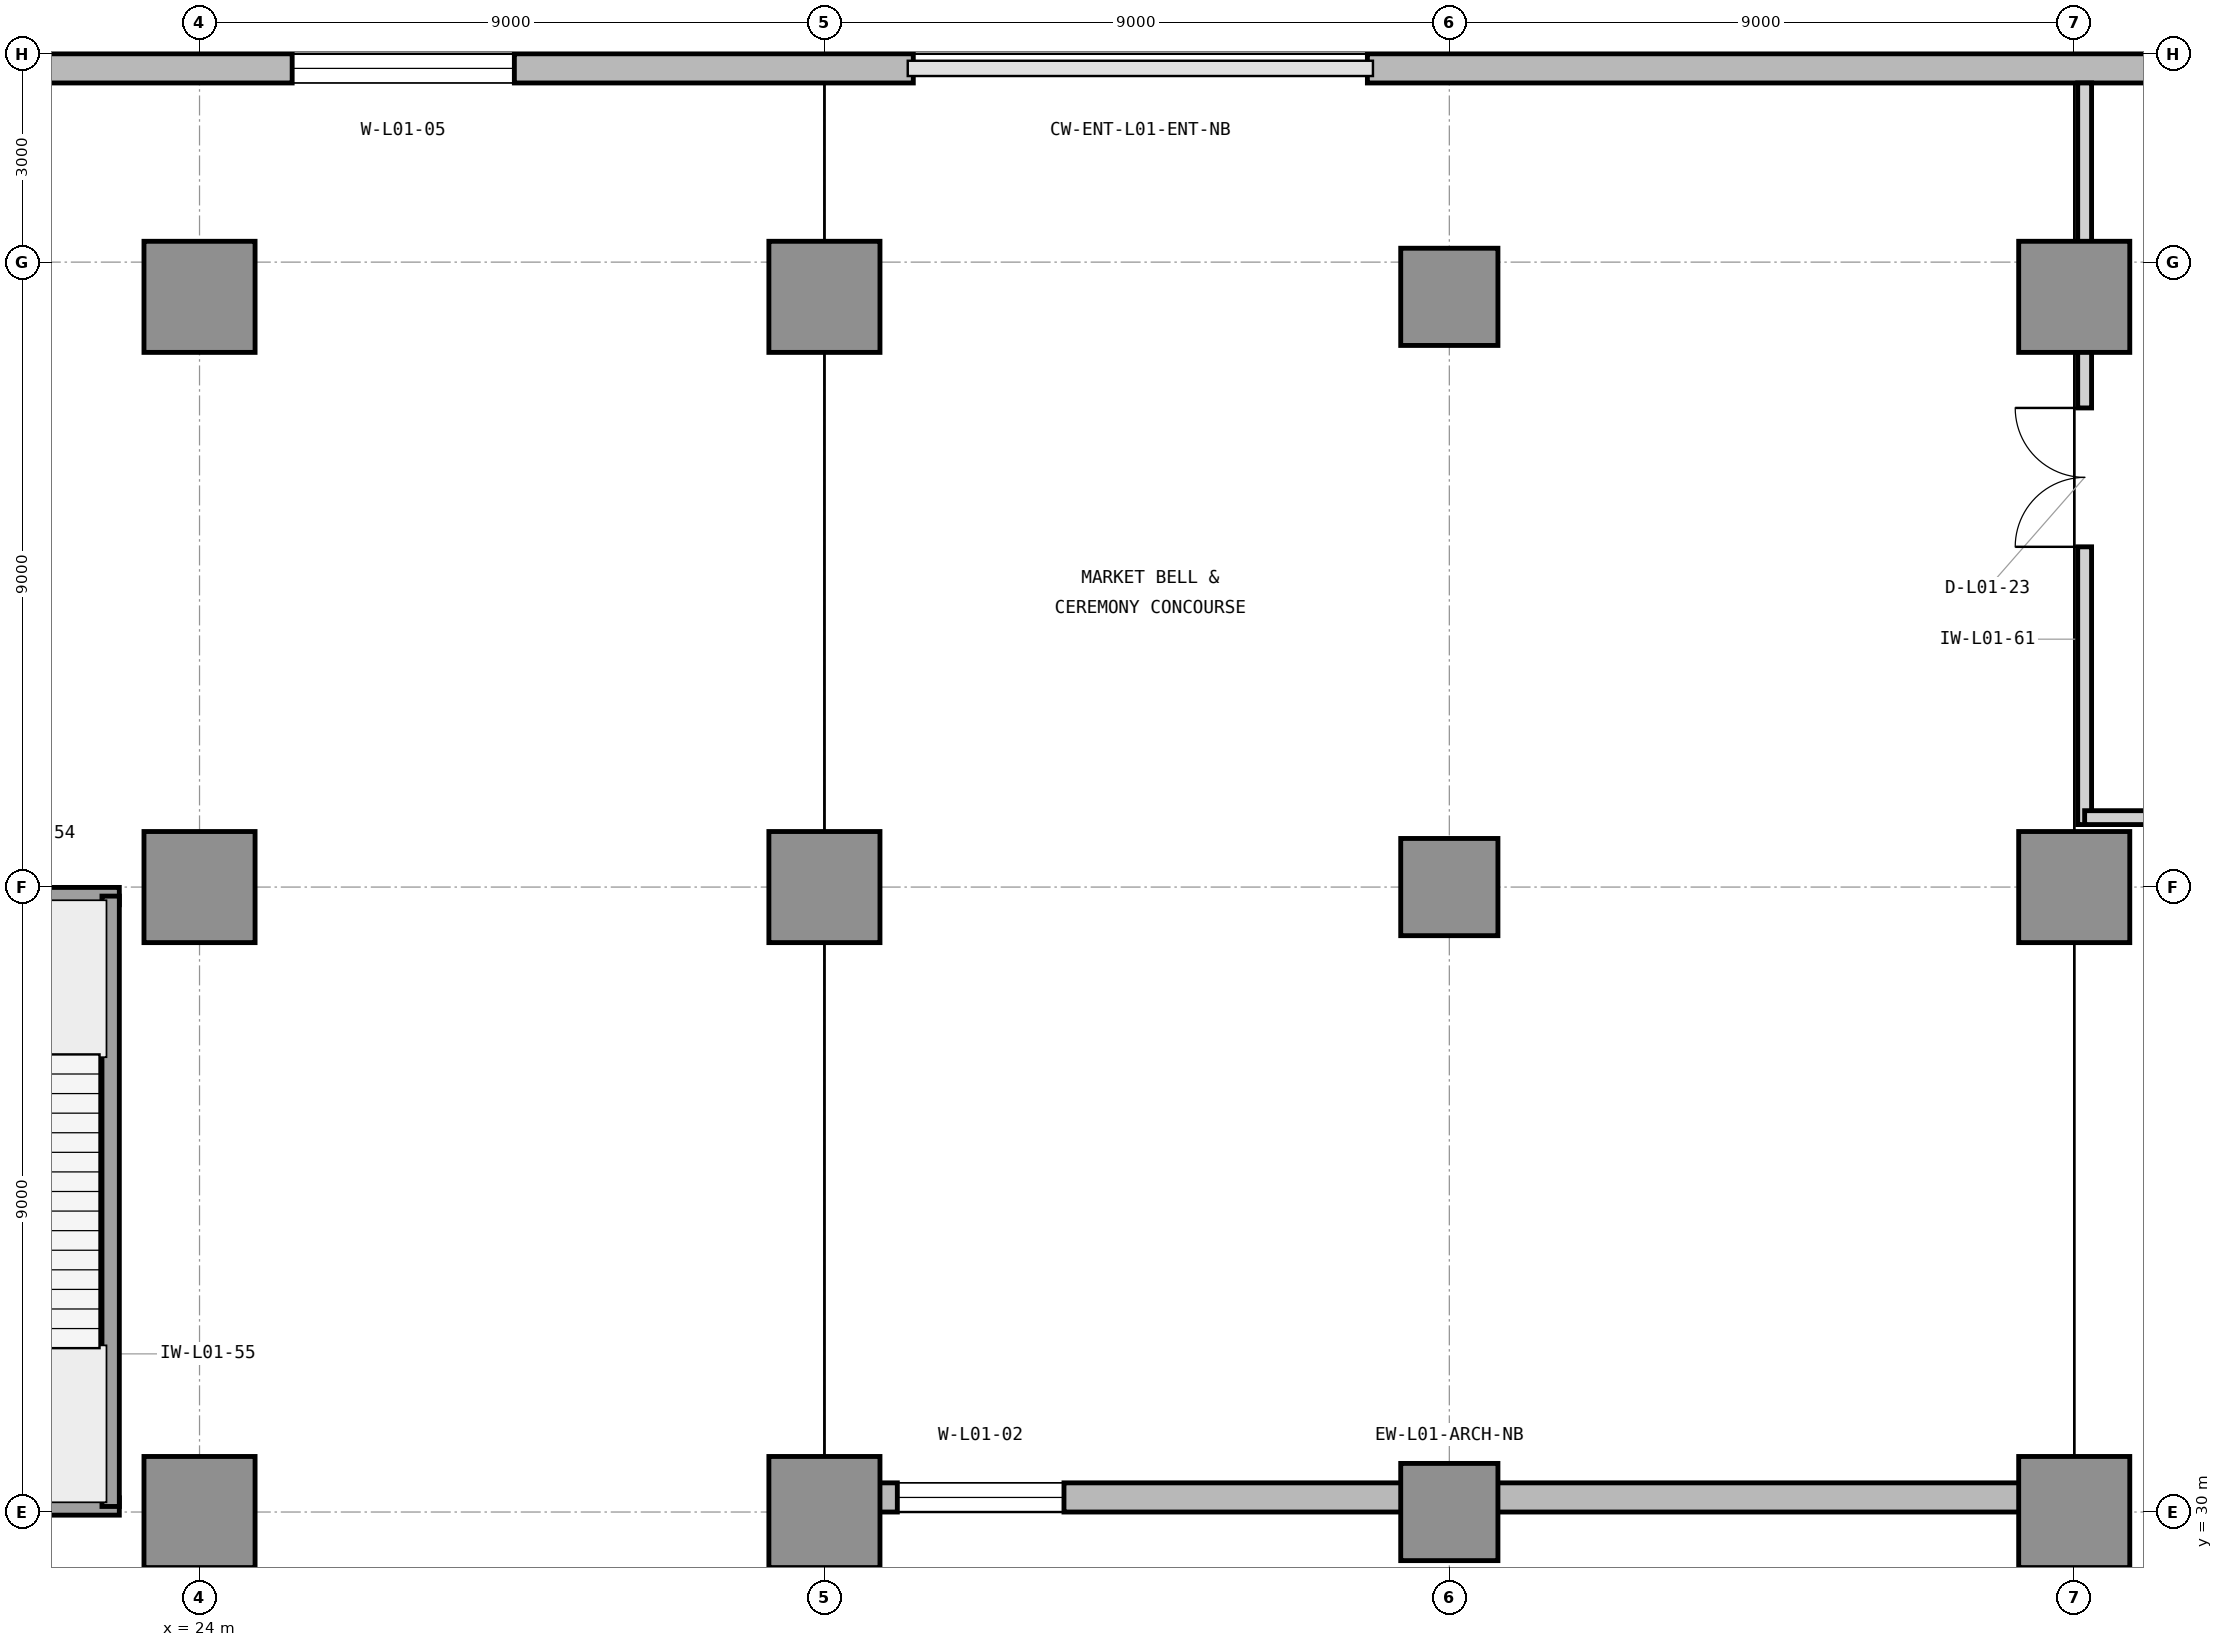
"""IFC4 building model, lengths in metres.
Left out: names, types, materials, properties, quantities, classifications, styles, units other than length and angle.
Written with IfcOpenShell. Run it as: python <this file> out.ifc"""

import sys

from ifc_helpers import new_model, si_unit, direction, frame, frame_2d, origin, origin_2d, place, context, subcontext, project, spatial, rectangle, extrude, element, fill, save


model = new_model("IFC4")
c1 = context("Model", 3, precision=1e-05, world=origin(), true_north=direction((0.0, 1.0)))
c2 = subcontext(c1, "Body", "Model", "MODEL_VIEW")
j1 = project(units=[si_unit("LENGTHUNIT", "METRE"), si_unit("PLANEANGLEUNIT", "RADIAN")], contexts=[c1])
p1 = place(None, origin())
s1 = spatial("IfcSite", under=j1, at=p1, CompositionType="ELEMENT")
p2 = place(p1, origin())
s2 = spatial("IfcBuilding", under=s1, at=p2, CompositionType="ELEMENT")
p3 = place(p2, frame((0.0, 0.0, 5.4)))
s3 = spatial("IfcBuildingStorey", under=s2, at=p3, CompositionType="ELEMENT", Elevation=5.4)
for number, where, z_axis, x_axis in (
    (1, (24.0, 30.0, 0.0), (0.0, 0.0, 1.0), (1.0, 0.0, 0.0)),
    (2, (24.0, 39.0, 0.0), (0.0, 0.0, 1.0), (1.0, 0.0, 0.0)),
    (3, (24.0, 47.5, 0.0), (0.0, 0.0, 1.0), (1.0, 0.0, 0.0)),
    (4, (33.0, 30.0, 0.0), (0.0, 0.0, 1.0), (1.0, 0.0, 0.0)),
    (5, (33.0, 39.0, 0.0), (0.0, 0.0, 1.0), (1.0, 0.0, 0.0)),
    (6, (33.0, 47.5, 0.0), (0.0, 0.0, 1.0), (1.0, 0.0, 0.0)),
):
    element("IfcColumn", number, at=place(p3, frame(where, z_axis=z_axis, x_axis=x_axis)), inside=s3, PredefinedType="COLUMN", context=c2, shape_type="SweptSolid", body=[
        extrude(rectangle(XDim=1.6, YDim=1.6, at=origin_2d()), origin(), (0.0, 0.0, 1.0), 5.4),
    ])
for number, where, z_axis, x_axis in (
    (7, (42.0, 30.0, 0.0), (0.0, 0.0, 1.0), (1.0, 0.0, 0.0)),
    (8, (42.0, 39.0, 0.0), (0.0, 0.0, 1.0), (1.0, 0.0, 0.0)),
    (9, (42.0, 47.5, 0.0), (0.0, 0.0, 1.0), (1.0, 0.0, 0.0)),
):
    element("IfcColumn", number, at=place(p3, frame(where, z_axis=z_axis, x_axis=x_axis)), inside=s3, PredefinedType="COLUMN", context=c2, shape_type="SweptSolid", body=[
        extrude(rectangle(XDim=1.4, YDim=1.4, at=origin_2d()), origin(), (0.0, 0.0, 1.0), 5.4),
    ])
for number, where, z_axis, x_axis in (
    (10, (51.0, 30.0, 0.0), (0.0, 0.0, 1.0), (1.0, 0.0, 0.0)),
    (11, (51.0, 39.0, 0.0), (0.0, 0.0, 1.0), (1.0, 0.0, 0.0)),
    (12, (51.0, 47.5, 0.0), (0.0, 0.0, 1.0), (1.0, 0.0, 0.0)),
):
    element("IfcColumn", number, at=place(p3, frame(where, z_axis=z_axis, x_axis=x_axis)), inside=s3, PredefinedType="COLUMN", context=c2, shape_type="SweptSolid", body=[
        extrude(rectangle(XDim=1.6, YDim=1.6, at=origin_2d()), origin(), (0.0, 0.0, 1.0), 5.4),
    ])
p4 = place(p3, frame((33.0, 30.21, 0.0), z_axis=(0.0, 0.0, 1.0), x_axis=(1.0, 0.0, 0.0)))
e13 = element("IfcWall", 13, at=p4, inside=s3, PredefinedType="STANDARD", context=c2, shape_type="SweptSolid", body=[
    extrude(rectangle(XDim=18.0, YDim=0.42, at=frame_2d((9.0, 0.0))), origin(), (0.0, 0.0, 1.0), 5.1),
])
p5 = place(p4, frame((1.05, 0.0, 1.0)))
e14 = element("IfcOpeningElement", 14, at=p5, cuts=e13, PredefinedType="OPENING", context=c2, shape_type="SweptSolid", body=[
    extrude(rectangle(XDim=2.4, YDim=2.9, at=frame_2d((1.2, 1.45))), frame((0.0, 0.22, 0.0), z_axis=(0.0, -1.0, 0.0), x_axis=(1.0, 0.0, 0.0)), (0.0, 0.0, 1.0), 0.44),
])
p6 = place(p3, frame((72.0, 50.79, 0.0), z_axis=(0.0, 0.0, 1.0), x_axis=(-1.0, 0.0, 0.0)))
e15 = element("IfcWall", 15, at=p6, inside=s3, PredefinedType="STANDARD", context=c2, shape_type="SweptSolid", body=[
    extrude(rectangle(XDim=31.18, YDim=0.42, at=frame_2d((15.59, 0.0))), origin(), (0.0, 0.0, 1.0), 5.1),
])
p7 = place(p3, frame((34.28, 50.79, 0.0), z_axis=(0.0, 0.0, 1.0), x_axis=(-1.0, 0.0, 0.0)))
e16 = element("IfcWall", 16, at=p7, inside=s3, PredefinedType="STANDARD", context=c2, shape_type="SweptSolid", body=[
    extrude(rectangle(XDim=34.28, YDim=0.42, at=frame_2d((17.14, 0.0))), origin(), (0.0, 0.0, 1.0), 5.1),
])
p8 = place(p7, frame((5.746, 0.0, 0.9)))
e17 = element("IfcOpeningElement", 17, at=p8, cuts=e16, PredefinedType="OPENING", context=c2, shape_type="SweptSolid", body=[
    extrude(rectangle(XDim=3.2, YDim=3.1, at=frame_2d((1.6, 1.55))), frame((0.0, 0.22, 0.0), z_axis=(0.0, -1.0, 0.0), x_axis=(1.0, 0.0, 0.0)), (0.0, 0.0, 1.0), 0.44),
])
for number, where, z_axis, x_axis in (
    (18, (17.555, 30.08, 0.0), (0.0, 0.0, 1.0), (1.0, 0.0, 0.0)),
    (19, (17.555, 38.87, 0.0), (0.0, 0.0, 1.0), (1.0, 0.0, 0.0)),
):
    element("IfcWall", number, at=place(p3, frame(where, z_axis=z_axis, x_axis=x_axis)), inside=s3, PredefinedType="SHEAR", context=c2, shape_type="SweptSolid", body=[
        extrude(rectangle(XDim=5.29, YDim=0.25, at=frame_2d((2.645, 0.0))), origin(), (0.0, 0.0, 1.0), 5.4),
    ])
p9 = place(p3, frame((22.72, 30.08, 0.0), z_axis=(0.0, 0.0, 1.0), x_axis=(0.0, 1.0, 0.0)))
e20 = element("IfcWall", 20, at=p9, inside=s3, PredefinedType="SHEAR", context=c2, shape_type="SweptSolid", body=[
    extrude(rectangle(XDim=8.79, YDim=0.25, at=frame_2d((4.395, 0.0))), origin(), (0.0, 0.0, 1.0), 5.4),
])
p10 = place(p3, frame((51.15, 39.9, 0.0), z_axis=(0.0, 0.0, 1.0), x_axis=(0.0, 1.0, 0.0)))
e21 = element("IfcWall", 21, at=p10, inside=s3, PredefinedType="PARTITIONING", context=c2, shape_type="SweptSolid", body=[
    extrude(rectangle(XDim=10.68, YDim=0.2, at=frame_2d((5.34, 0.0))), origin(), (0.0, 0.0, 1.0), 4.234),
])
p11 = place(p10, frame((4.0, 0.0, 0.0)))
e22 = element("IfcOpeningElement", 22, at=p11, cuts=e21, PredefinedType="OPENING", context=c2, shape_type="SweptSolid", body=[
    extrude(rectangle(XDim=2.0, YDim=2.5, at=frame_2d((1.0, 1.25))), frame((0.0, 0.11, 0.0), z_axis=(0.0, -1.0, 0.0), x_axis=(1.0, 0.0, 0.0)), (0.0, 0.0, 1.0), 0.22),
])
p12 = place(p3, frame((51.15, 40.0, 0.0), z_axis=(0.0, 0.0, 1.0), x_axis=(1.0, 0.0, 0.0)))
e23 = element("IfcWall", 23, at=p12, inside=s3, PredefinedType="PARTITIONING", context=c2, shape_type="SweptSolid", body=[
    extrude(rectangle(XDim=20.43, YDim=0.2, at=frame_2d((10.215, 0.0))), origin(), (0.0, 0.0, 1.0), 5.09),
])
p13 = place(p12, frame((3.5, 0.0, 0.0)))
e24 = element("IfcOpeningElement", 24, at=p13, cuts=e23, PredefinedType="OPENING", context=c2, shape_type="SweptSolid", body=[
    extrude(rectangle(XDim=2.0, YDim=2.5, at=frame_2d((1.0, 1.25))), frame((0.0, 0.11, 0.0), z_axis=(0.0, -1.0, 0.0), x_axis=(1.0, 0.0, 0.0)), (0.0, 0.0, 1.0), 0.22),
])
p14 = place(p12, frame((13.5, 0.0, 0.0)))
e25 = element("IfcOpeningElement", 25, at=p14, cuts=e23, PredefinedType="OPENING", context=c2, shape_type="SweptSolid", body=[
    extrude(rectangle(XDim=2.0, YDim=2.5, at=frame_2d((1.0, 1.25))), frame((0.0, 0.11, 0.0), z_axis=(0.0, -1.0, 0.0), x_axis=(1.0, 0.0, 0.0)), (0.0, 0.0, 1.0), 0.22),
])
p15 = place(p5, origin())
e26 = element("IfcWindow", 26, at=p15, inside=s3, PartitioningType="SINGLE_PANEL", PredefinedType="WINDOW", context=c2, shape_type="SweptSolid", body=[
    extrude(rectangle(XDim=2.4, YDim=2.9, at=frame_2d((1.2, 1.45))), frame((0.0, 0.11, 0.0), z_axis=(0.0, -1.0, 0.0), x_axis=(1.0, 0.0, 0.0)), (0.0, 0.0, 1.0), 0.06),
])
fill(e14, e26)
p16 = place(p8, origin())
e27 = element("IfcWindow", 27, at=p16, inside=s3, PartitioningType="SINGLE_PANEL", PredefinedType="WINDOW", context=c2, shape_type="SweptSolid", body=[
    extrude(rectangle(XDim=3.2, YDim=3.1, at=frame_2d((1.6, 1.55))), frame((0.0, 0.11, 0.0), z_axis=(0.0, -1.0, 0.0), x_axis=(1.0, 0.0, 0.0)), (0.0, 0.0, 1.0), 0.06),
])
fill(e17, e27)
p17 = place(p11, origin())
e28 = element("IfcDoor", 28, at=p17, inside=s3, OperationType="DOUBLE_DOOR_SINGLE_SWING", PredefinedType="DOOR", context=c2, shape_type="SweptSolid", body=[
    extrude(rectangle(XDim=2.0, YDim=2.5, at=frame_2d((1.0, 1.25))), frame((0.0, 0.025, 0.0), z_axis=(0.0, -1.0, 0.0), x_axis=(1.0, 0.0, 0.0)), (0.0, 0.0, 1.0), 0.05),
])
fill(e22, e28)
save(model, sys.argv[1])
